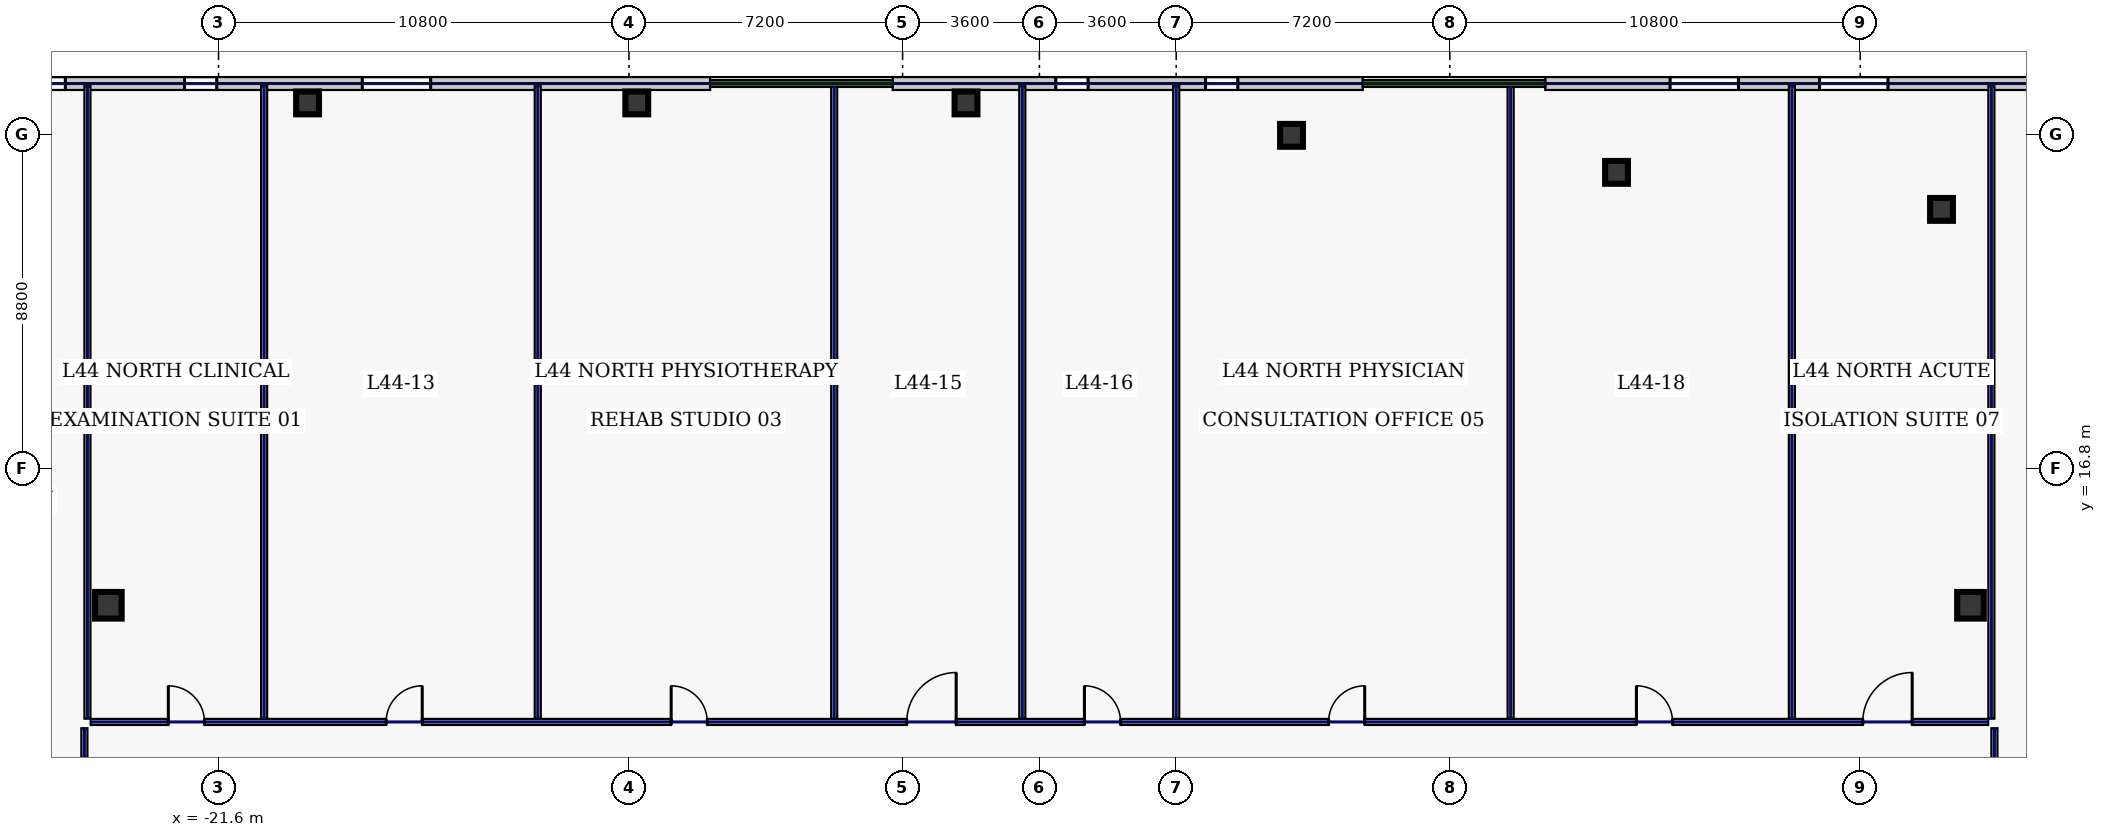
"""IFC4 building model, lengths in metres.
Left out: names, types, materials, properties, quantities, classifications, styles, units other than length and angle.
Written with IfcOpenShell. Run it as: python <this file> out.ifc"""

import sys

from ifc_helpers import new_model, si_unit, direction, frame, frame_2d, origin, origin_2d, place, context, subcontext, project, spatial, rectangle, hollow_rectangle, extrude, element, fill, save


model = new_model("IFC4")
c1 = context("Model", 3, precision=1e-05, world=origin(), true_north=direction((0.0, 1.0)))
c2 = subcontext(c1, "Body", "Model", "MODEL_VIEW")
j1 = project(units=[si_unit("LENGTHUNIT", "METRE"), si_unit("PLANEANGLEUNIT", "RADIAN")], contexts=[c1])
p1 = place(None, origin())
s1 = spatial("IfcSite", under=j1, at=p1, CompositionType="ELEMENT")
p2 = place(p1, origin())
s2 = spatial("IfcBuilding", under=s1, at=p2, CompositionType="ELEMENT")
p3 = place(p2, frame((0.0, 0.0, 192.2)))
s3 = spatial("IfcBuildingStorey", under=s2, at=p3, CompositionType="ELEMENT", Elevation=192.2)
for number, where, z_axis, x_axis in (
    (1, (-24.5, 13.2, 0.0), (0.0, 0.0, 1.0), (1.0, 0.0, 0.0)),
    (2, (24.5, 13.2, 0.0), (0.0, 0.0, 1.0), (1.0, 0.0, 0.0)),
):
    element("IfcColumn", number, at=place(p3, frame(where, z_axis=z_axis, x_axis=x_axis)), inside=s3, PredefinedType="COLUMN", context=c2, shape_type="SweptSolid", body=[
        extrude(hollow_rectangle(XDim=0.7, YDim=0.7, WallThickness=0.032, at=origin_2d()), origin(), (0.0, 0.0, 1.0), 3.74),
    ])
for number, where, z_axis, x_axis in (
    (3, (23.738, 23.618, 0.0), (0.0, 0.0, 1.0), (1.0, 0.0, 0.0)),
    (4, (15.186, 24.592, 0.0), (0.0, 0.0, 1.0), (1.0, 0.0, 0.0)),
    (5, (6.634, 25.567, 0.0), (0.0, 0.0, 1.0), (1.0, 0.0, 0.0)),
    (6, (-1.931, 26.42, 0.0), (0.0, 0.0, 1.0), (1.0, 0.0, 0.0)),
    (7, (-10.594, 26.42, 0.0), (0.0, 0.0, 1.0), (1.0, 0.0, 0.0)),
    (8, (-19.257, 26.42, 0.0), (0.0, 0.0, 1.0), (1.0, 0.0, 0.0)),
):
    element("IfcColumn", number, at=place(p3, frame(where, z_axis=z_axis, x_axis=x_axis)), inside=s3, PredefinedType="COLUMN", context=c2, shape_type="SweptSolid", body=[
        extrude(hollow_rectangle(XDim=0.6, YDim=0.6, WallThickness=0.028, at=origin_2d()), origin(), (0.0, 0.0, 1.0), 3.74),
    ])
p4 = place(p3, frame((33.4, 26.93, 0.0), z_axis=(0.0, 0.0, 1.0), x_axis=(-1.0, 0.0, 0.0)))
e9 = element("IfcWall", 9, at=p4, inside=s3, PredefinedType="STANDARD", context=c2, shape_type="SweptSolid", body=[
    extrude(rectangle(XDim=20.09, YDim=0.34, at=frame_2d((10.045, 0.0))), origin(), (0.0, 0.0, 1.0), 3.74),
])
p5 = place(p4, frame((15.005, 0.0, 0.7)))
e10 = element("IfcOpeningElement", 10, at=p5, cuts=e9, PredefinedType="OPENING", context=c2, shape_type="SweptSolid", body=[
    extrude(rectangle(XDim=1.8, YDim=2.2, at=frame_2d((0.9, 1.1))), frame((0.0, 0.18, 0.0), z_axis=(0.0, -1.0, 0.0), x_axis=(1.0, 0.0, 0.0)), (0.0, 0.0, 1.0), 0.36),
])
p6 = place(p4, frame((11.071, 0.0, 0.7)))
e11 = element("IfcOpeningElement", 11, at=p6, cuts=e9, PredefinedType="OPENING", context=c2, shape_type="SweptSolid", body=[
    extrude(rectangle(XDim=1.8, YDim=2.2, at=frame_2d((0.9, 1.1))), frame((0.0, 0.18, 0.0), z_axis=(0.0, -1.0, 0.0), x_axis=(1.0, 0.0, 0.0)), (0.0, 0.0, 1.0), 0.36),
])
p7 = place(p4, frame((6.48, 0.0, 0.7)))
e12 = element("IfcOpeningElement", 12, at=p7, cuts=e9, PredefinedType="OPENING", context=c2, shape_type="SweptSolid", body=[
    extrude(rectangle(XDim=0.85, YDim=1.85, at=frame_2d((0.425, 0.925))), frame((0.0, 0.18, 0.0), z_axis=(0.0, -1.0, 0.0), x_axis=(1.0, 0.0, 0.0)), (0.0, 0.0, 1.0), 0.36),
])
p8 = place(p4, frame((2.591, 0.0, 0.7)))
e13 = element("IfcOpeningElement", 13, at=p8, cuts=e9, PredefinedType="OPENING", context=c2, shape_type="SweptSolid", body=[
    extrude(rectangle(XDim=1.8, YDim=2.2, at=frame_2d((0.9, 1.1))), frame((0.0, 0.18, 0.0), z_axis=(0.0, -1.0, 0.0), x_axis=(1.0, 0.0, 0.0)), (0.0, 0.0, 1.0), 0.36),
])
p9 = place(p3, frame((8.51, 26.93, 0.0), z_axis=(0.0, 0.0, 1.0), x_axis=(-1.0, 0.0, 0.0)))
e14 = element("IfcWall", 14, at=p9, inside=s3, PredefinedType="STANDARD", context=c2, shape_type="SweptSolid", body=[
    extrude(rectangle(XDim=12.373, YDim=0.34, at=frame_2d((6.187, 0.0))), origin(), (0.0, 0.0, 1.0), 3.74),
])
p10 = place(p9, frame((7.229, 0.0, 0.7)))
e15 = element("IfcOpeningElement", 15, at=p10, cuts=e14, PredefinedType="OPENING", context=c2, shape_type="SweptSolid", body=[
    extrude(rectangle(XDim=0.85, YDim=1.85, at=frame_2d((0.425, 0.925))), frame((0.0, 0.18, 0.0), z_axis=(0.0, -1.0, 0.0), x_axis=(1.0, 0.0, 0.0)), (0.0, 0.0, 1.0), 0.36),
])
p11 = place(p9, frame((3.289, 0.0, 0.7)))
e16 = element("IfcOpeningElement", 16, at=p11, cuts=e14, PredefinedType="OPENING", context=c2, shape_type="SweptSolid", body=[
    extrude(rectangle(XDim=0.85, YDim=1.85, at=frame_2d((0.425, 0.925))), frame((0.0, 0.18, 0.0), z_axis=(0.0, -1.0, 0.0), x_axis=(1.0, 0.0, 0.0)), (0.0, 0.0, 1.0), 0.36),
])
p12 = place(p3, frame((-8.663, 26.93, 0.0), z_axis=(0.0, 0.0, 1.0), x_axis=(-1.0, 0.0, 0.0)))
e17 = element("IfcWall", 17, at=p12, inside=s3, PredefinedType="STANDARD", context=c2, shape_type="SweptSolid", body=[
    extrude(rectangle(XDim=19.937, YDim=0.34, at=frame_2d((9.969, 0.0))), origin(), (0.0, 0.0, 1.0), 3.74),
])
p13 = place(p12, frame((16.968, 0.0, 0.7)))
e18 = element("IfcOpeningElement", 18, at=p13, cuts=e17, PredefinedType="OPENING", context=c2, shape_type="SweptSolid", body=[
    extrude(rectangle(XDim=0.85, YDim=1.85, at=frame_2d((0.425, 0.925))), frame((0.0, 0.18, 0.0), z_axis=(0.0, -1.0, 0.0), x_axis=(1.0, 0.0, 0.0)), (0.0, 0.0, 1.0), 0.36),
])
p14 = place(p12, frame((12.983, 0.0, 0.7)))
e19 = element("IfcOpeningElement", 19, at=p14, cuts=e17, PredefinedType="OPENING", context=c2, shape_type="SweptSolid", body=[
    extrude(rectangle(XDim=0.85, YDim=1.85, at=frame_2d((0.425, 0.925))), frame((0.0, 0.18, 0.0), z_axis=(0.0, -1.0, 0.0), x_axis=(1.0, 0.0, 0.0)), (0.0, 0.0, 1.0), 0.36),
])
p15 = place(p12, frame((7.355, 0.0, 0.7)))
e20 = element("IfcOpeningElement", 20, at=p15, cuts=e17, PredefinedType="OPENING", context=c2, shape_type="SweptSolid", body=[
    extrude(rectangle(XDim=1.8, YDim=2.2, at=frame_2d((0.9, 1.1))), frame((0.0, 0.18, 0.0), z_axis=(0.0, -1.0, 0.0), x_axis=(1.0, 0.0, 0.0)), (0.0, 0.0, 1.0), 0.36),
])
p16 = place(p3, frame((-25.13, 6.985, 0.0), z_axis=(0.0, 0.0, 1.0), x_axis=(0.0, 1.0, 0.0)))
e21 = element("IfcWall", 21, at=p16, inside=s3, PredefinedType="PARTITIONING", context=c2, shape_type="SweptSolid", body=[
    extrude(rectangle(XDim=2.98, YDim=0.16, at=frame_2d((1.49, 0.0))), origin(), (0.0, 0.0, 1.0), 3.74),
])
p17 = place(p16, frame((1.1, 0.0, 0.0)))
e22 = element("IfcOpeningElement", 22, at=p17, cuts=e21, PredefinedType="OPENING", context=c2, shape_type="SweptSolid", body=[
    extrude(rectangle(XDim=0.95, YDim=2.2, at=frame_2d((0.475, 1.1))), frame((0.0, 0.09, 0.0), z_axis=(0.0, -1.0, 0.0), x_axis=(1.0, 0.0, 0.0)), (0.0, 0.0, 1.0), 0.18),
])
p18 = place(p3, frame((-24.965, 10.13, 0.0), z_axis=(0.0, 0.0, 1.0), x_axis=(1.0, 0.0, 0.0)))
e23 = element("IfcWall", 23, at=p18, inside=s3, PredefinedType="PARTITIONING", context=c2, shape_type="SweptSolid", body=[
    extrude(rectangle(XDim=49.93, YDim=0.16, at=frame_2d((24.965, 0.0))), origin(), (0.0, 0.0, 1.0), 3.74),
])
p19 = place(p18, frame((2.044, 0.0, 0.0)))
e24 = element("IfcOpeningElement", 24, at=p19, cuts=e23, PredefinedType="OPENING", context=c2, shape_type="SweptSolid", body=[
    extrude(rectangle(XDim=0.95, YDim=2.2, at=frame_2d((0.475, 1.1))), frame((0.0, 0.09, 0.0), z_axis=(0.0, -1.0, 0.0), x_axis=(1.0, 0.0, 0.0)), (0.0, 0.0, 1.0), 0.18),
])
p20 = place(p18, frame((7.775, 0.0, 0.0)))
e25 = element("IfcOpeningElement", 25, at=p20, cuts=e23, PredefinedType="OPENING", context=c2, shape_type="SweptSolid", body=[
    extrude(rectangle(XDim=0.95, YDim=2.2, at=frame_2d((0.475, 1.1))), frame((0.0, 0.09, 0.0), z_axis=(0.0, -1.0, 0.0), x_axis=(1.0, 0.0, 0.0)), (0.0, 0.0, 1.0), 0.18),
])
p21 = place(p18, frame((15.275, 0.0, 0.0)))
e26 = element("IfcOpeningElement", 26, at=p21, cuts=e23, PredefinedType="OPENING", context=c2, shape_type="SweptSolid", body=[
    extrude(rectangle(XDim=0.95, YDim=2.2, at=frame_2d((0.475, 1.1))), frame((0.0, 0.09, 0.0), z_axis=(0.0, -1.0, 0.0), x_axis=(1.0, 0.0, 0.0)), (0.0, 0.0, 1.0), 0.18),
])
p22 = place(p18, frame((21.475, 0.0, 0.0)))
e27 = element("IfcOpeningElement", 27, at=p22, cuts=e23, PredefinedType="OPENING", context=c2, shape_type="SweptSolid", body=[
    extrude(rectangle(XDim=1.3, YDim=2.2, at=frame_2d((0.65, 1.1))), frame((0.0, 0.09, 0.0), z_axis=(0.0, -1.0, 0.0), x_axis=(1.0, 0.0, 0.0)), (0.0, 0.0, 1.0), 0.18),
])
p23 = place(p18, frame((26.15, 0.0, 0.0)))
e28 = element("IfcOpeningElement", 28, at=p23, cuts=e23, PredefinedType="OPENING", context=c2, shape_type="SweptSolid", body=[
    extrude(rectangle(XDim=0.95, YDim=2.2, at=frame_2d((0.475, 1.1))), frame((0.0, 0.09, 0.0), z_axis=(0.0, -1.0, 0.0), x_axis=(1.0, 0.0, 0.0)), (0.0, 0.0, 1.0), 0.18),
])
p24 = place(p18, frame((32.575, 0.0, 0.0)))
e29 = element("IfcOpeningElement", 29, at=p24, cuts=e23, PredefinedType="OPENING", context=c2, shape_type="SweptSolid", body=[
    extrude(rectangle(XDim=0.95, YDim=2.2, at=frame_2d((0.475, 1.1))), frame((0.0, 0.09, 0.0), z_axis=(0.0, -1.0, 0.0), x_axis=(1.0, 0.0, 0.0)), (0.0, 0.0, 1.0), 0.18),
])
p25 = place(p18, frame((40.675, 0.0, 0.0)))
e30 = element("IfcOpeningElement", 30, at=p25, cuts=e23, PredefinedType="OPENING", context=c2, shape_type="SweptSolid", body=[
    extrude(rectangle(XDim=0.95, YDim=2.2, at=frame_2d((0.475, 1.1))), frame((0.0, 0.09, 0.0), z_axis=(0.0, -1.0, 0.0), x_axis=(1.0, 0.0, 0.0)), (0.0, 0.0, 1.0), 0.18),
])
p26 = place(p18, frame((46.631, 0.0, 0.0)))
e31 = element("IfcOpeningElement", 31, at=p26, cuts=e23, PredefinedType="OPENING", context=c2, shape_type="SweptSolid", body=[
    extrude(rectangle(XDim=1.3, YDim=2.2, at=frame_2d((0.65, 1.1))), frame((0.0, 0.09, 0.0), z_axis=(0.0, -1.0, 0.0), x_axis=(1.0, 0.0, 0.0)), (0.0, 0.0, 1.0), 0.18),
])
p27 = place(p3, frame((25.13, 9.965, 0.0), z_axis=(0.0, 0.0, 1.0), x_axis=(0.0, -1.0, 0.0)))
e32 = element("IfcWall", 32, at=p27, inside=s3, PredefinedType="PARTITIONING", context=c2, shape_type="SweptSolid", body=[
    extrude(rectangle(XDim=2.98, YDim=0.16, at=frame_2d((1.49, 0.0))), origin(), (0.0, 0.0, 1.0), 3.74),
])
p28 = place(p27, frame((1.1, 0.0, 0.0)))
e33 = element("IfcOpeningElement", 33, at=p28, cuts=e32, PredefinedType="OPENING", context=c2, shape_type="SweptSolid", body=[
    extrude(rectangle(XDim=0.95, YDim=2.2, at=frame_2d((0.475, 1.1))), frame((0.0, 0.09, 0.0), z_axis=(0.0, -1.0, 0.0), x_axis=(1.0, 0.0, 0.0)), (0.0, 0.0, 1.0), 0.18),
])
p29 = place(p3, frame((-25.05, 10.215, 0.0), z_axis=(0.0, 0.0, 1.0), x_axis=(0.0, 1.0, 0.0)))
e34 = element("IfcWall", 34, at=p29, inside=s3, PredefinedType="PARTITIONING", context=c2, shape_type="SweptSolid", body=[
    extrude(rectangle(XDim=16.645, YDim=0.16, at=frame_2d((8.323, 0.0))), origin(), (0.0, 0.0, 1.0), 3.285),
])
for number, where, z_axis, x_axis in (
    (35, (25.05, 10.215, 0.0), (0.0, 0.0, 1.0), (0.0, 1.0, 0.0)),
    (36, (-20.4, 10.215, 0.0), (0.0, 0.0, 1.0), (0.0, 1.0, 0.0)),
    (37, (-13.2, 10.215, 0.0), (0.0, 0.0, 1.0), (0.0, 1.0, 0.0)),
    (38, (-5.4, 10.215, 0.0), (0.0, 0.0, 1.0), (0.0, 1.0, 0.0)),
    (39, (3.6, 10.215, 0.0), (0.0, 0.0, 1.0), (0.0, 1.0, 0.0)),
    (40, (12.4, 10.215, 0.0), (0.0, 0.0, 1.0), (0.0, 1.0, 0.0)),
    (41, (19.8, 10.215, 0.0), (0.0, 0.0, 1.0), (0.0, 1.0, 0.0)),
    (42, (-0.45, 10.215, 0.0), (0.0, 0.0, 1.0), (0.0, 1.0, 0.0)),
):
    element("IfcWall", number, at=place(p3, frame(where, z_axis=z_axis, x_axis=x_axis)), inside=s3, PredefinedType="PARTITIONING", context=c2, shape_type="SweptSolid", body=[
        extrude(rectangle(XDim=16.645, YDim=0.16, at=frame_2d((8.323, 0.0))), origin(), (0.0, 0.0, 1.0), 3.74),
    ])
p30 = place(p5, origin())
e43 = element("IfcWindow", 43, at=p30, inside=s3, PartitioningType="SINGLE_PANEL", PredefinedType="WINDOW", context=c2, shape_type="SweptSolid", body=[
    extrude(rectangle(XDim=1.8, YDim=2.2, at=frame_2d((0.9, 1.1))), frame((0.0, 0.03, 0.0), z_axis=(0.0, -1.0, 0.0), x_axis=(1.0, 0.0, 0.0)), (0.0, 0.0, 1.0), 0.06),
])
fill(e10, e43)
p31 = place(p6, origin())
e44 = element("IfcWindow", 44, at=p31, inside=s3, PartitioningType="SINGLE_PANEL", PredefinedType="WINDOW", context=c2, shape_type="SweptSolid", body=[
    extrude(rectangle(XDim=1.8, YDim=2.2, at=frame_2d((0.9, 1.1))), frame((0.0, 0.03, 0.0), z_axis=(0.0, -1.0, 0.0), x_axis=(1.0, 0.0, 0.0)), (0.0, 0.0, 1.0), 0.06),
])
fill(e11, e44)
p32 = place(p10, origin())
e45 = element("IfcWindow", 45, at=p32, inside=s3, PartitioningType="SINGLE_PANEL", PredefinedType="WINDOW", context=c2, shape_type="SweptSolid", body=[
    extrude(rectangle(XDim=0.85, YDim=1.85, at=frame_2d((0.425, 0.925))), frame((0.0, 0.03, 0.0), z_axis=(0.0, -1.0, 0.0), x_axis=(1.0, 0.0, 0.0)), (0.0, 0.0, 1.0), 0.06),
])
fill(e15, e45)
p33 = place(p11, origin())
e46 = element("IfcWindow", 46, at=p33, inside=s3, PartitioningType="SINGLE_PANEL", PredefinedType="WINDOW", context=c2, shape_type="SweptSolid", body=[
    extrude(rectangle(XDim=0.85, YDim=1.85, at=frame_2d((0.425, 0.925))), frame((0.0, 0.03, 0.0), z_axis=(0.0, -1.0, 0.0), x_axis=(1.0, 0.0, 0.0)), (0.0, 0.0, 1.0), 0.06),
])
fill(e16, e46)
p34 = place(p13, origin())
e47 = element("IfcWindow", 47, at=p34, inside=s3, PartitioningType="SINGLE_PANEL", PredefinedType="WINDOW", context=c2, shape_type="SweptSolid", body=[
    extrude(rectangle(XDim=0.85, YDim=1.85, at=frame_2d((0.425, 0.925))), frame((0.0, 0.03, 0.0), z_axis=(0.0, -1.0, 0.0), x_axis=(1.0, 0.0, 0.0)), (0.0, 0.0, 1.0), 0.06),
])
fill(e18, e47)
p35 = place(p14, origin())
e48 = element("IfcWindow", 48, at=p35, inside=s3, PartitioningType="SINGLE_PANEL", PredefinedType="WINDOW", context=c2, shape_type="SweptSolid", body=[
    extrude(rectangle(XDim=0.85, YDim=1.85, at=frame_2d((0.425, 0.925))), frame((0.0, 0.03, 0.0), z_axis=(0.0, -1.0, 0.0), x_axis=(1.0, 0.0, 0.0)), (0.0, 0.0, 1.0), 0.06),
])
fill(e19, e48)
p36 = place(p15, origin())
e49 = element("IfcWindow", 49, at=p36, inside=s3, PartitioningType="SINGLE_PANEL", PredefinedType="WINDOW", context=c2, shape_type="SweptSolid", body=[
    extrude(rectangle(XDim=1.8, YDim=2.2, at=frame_2d((0.9, 1.1))), frame((0.0, 0.03, 0.0), z_axis=(0.0, -1.0, 0.0), x_axis=(1.0, 0.0, 0.0)), (0.0, 0.0, 1.0), 0.06),
])
fill(e20, e49)
p37 = place(p19, origin())
e50 = element("IfcDoor", 50, at=p37, inside=s3, OperationType="SINGLE_SWING_LEFT", PredefinedType="DOOR", context=c2, shape_type="SweptSolid", body=[
    extrude(rectangle(XDim=0.95, YDim=2.2, at=frame_2d((0.475, 1.1))), frame((0.0, 0.025, 0.0), z_axis=(0.0, -1.0, 0.0), x_axis=(1.0, 0.0, 0.0)), (0.0, 0.0, 1.0), 0.05),
])
fill(e24, e50)
p38 = place(p20, origin())
e51 = element("IfcDoor", 51, at=p38, inside=s3, OperationType="SINGLE_SWING_RIGHT", PredefinedType="DOOR", context=c2, shape_type="SweptSolid", body=[
    extrude(rectangle(XDim=0.95, YDim=2.2, at=frame_2d((0.475, 1.1))), frame((0.0, 0.025, 0.0), z_axis=(0.0, -1.0, 0.0), x_axis=(1.0, 0.0, 0.0)), (0.0, 0.0, 1.0), 0.05),
])
fill(e25, e51)
p39 = place(p21, origin())
e52 = element("IfcDoor", 52, at=p39, inside=s3, OperationType="SINGLE_SWING_LEFT", PredefinedType="DOOR", context=c2, shape_type="SweptSolid", body=[
    extrude(rectangle(XDim=0.95, YDim=2.2, at=frame_2d((0.475, 1.1))), frame((0.0, 0.025, 0.0), z_axis=(0.0, -1.0, 0.0), x_axis=(1.0, 0.0, 0.0)), (0.0, 0.0, 1.0), 0.05),
])
fill(e26, e52)
p40 = place(p22, origin())
e53 = element("IfcDoor", 53, at=p40, inside=s3, OperationType="SINGLE_SWING_RIGHT", PredefinedType="DOOR", context=c2, shape_type="SweptSolid", body=[
    extrude(rectangle(XDim=1.3, YDim=2.2, at=frame_2d((0.65, 1.1))), frame((0.0, 0.025, 0.0), z_axis=(0.0, -1.0, 0.0), x_axis=(1.0, 0.0, 0.0)), (0.0, 0.0, 1.0), 0.05),
])
fill(e27, e53)
p41 = place(p23, origin())
e54 = element("IfcDoor", 54, at=p41, inside=s3, OperationType="SINGLE_SWING_LEFT", PredefinedType="DOOR", context=c2, shape_type="SweptSolid", body=[
    extrude(rectangle(XDim=0.95, YDim=2.2, at=frame_2d((0.475, 1.1))), frame((0.0, 0.025, 0.0), z_axis=(0.0, -1.0, 0.0), x_axis=(1.0, 0.0, 0.0)), (0.0, 0.0, 1.0), 0.05),
])
fill(e28, e54)
p42 = place(p24, origin())
e55 = element("IfcDoor", 55, at=p42, inside=s3, OperationType="SINGLE_SWING_RIGHT", PredefinedType="DOOR", context=c2, shape_type="SweptSolid", body=[
    extrude(rectangle(XDim=0.95, YDim=2.2, at=frame_2d((0.475, 1.1))), frame((0.0, 0.025, 0.0), z_axis=(0.0, -1.0, 0.0), x_axis=(1.0, 0.0, 0.0)), (0.0, 0.0, 1.0), 0.05),
])
fill(e29, e55)
p43 = place(p25, origin())
e56 = element("IfcDoor", 56, at=p43, inside=s3, OperationType="SINGLE_SWING_LEFT", PredefinedType="DOOR", context=c2, shape_type="SweptSolid", body=[
    extrude(rectangle(XDim=0.95, YDim=2.2, at=frame_2d((0.475, 1.1))), frame((0.0, 0.025, 0.0), z_axis=(0.0, -1.0, 0.0), x_axis=(1.0, 0.0, 0.0)), (0.0, 0.0, 1.0), 0.05),
])
fill(e30, e56)
p44 = place(p26, origin())
e57 = element("IfcDoor", 57, at=p44, inside=s3, OperationType="SINGLE_SWING_RIGHT", PredefinedType="DOOR", context=c2, shape_type="SweptSolid", body=[
    extrude(rectangle(XDim=1.3, YDim=2.2, at=frame_2d((0.65, 1.1))), frame((0.0, 0.025, 0.0), z_axis=(0.0, -1.0, 0.0), x_axis=(1.0, 0.0, 0.0)), (0.0, 0.0, 1.0), 0.05),
])
fill(e31, e57)
save(model, sys.argv[1])
